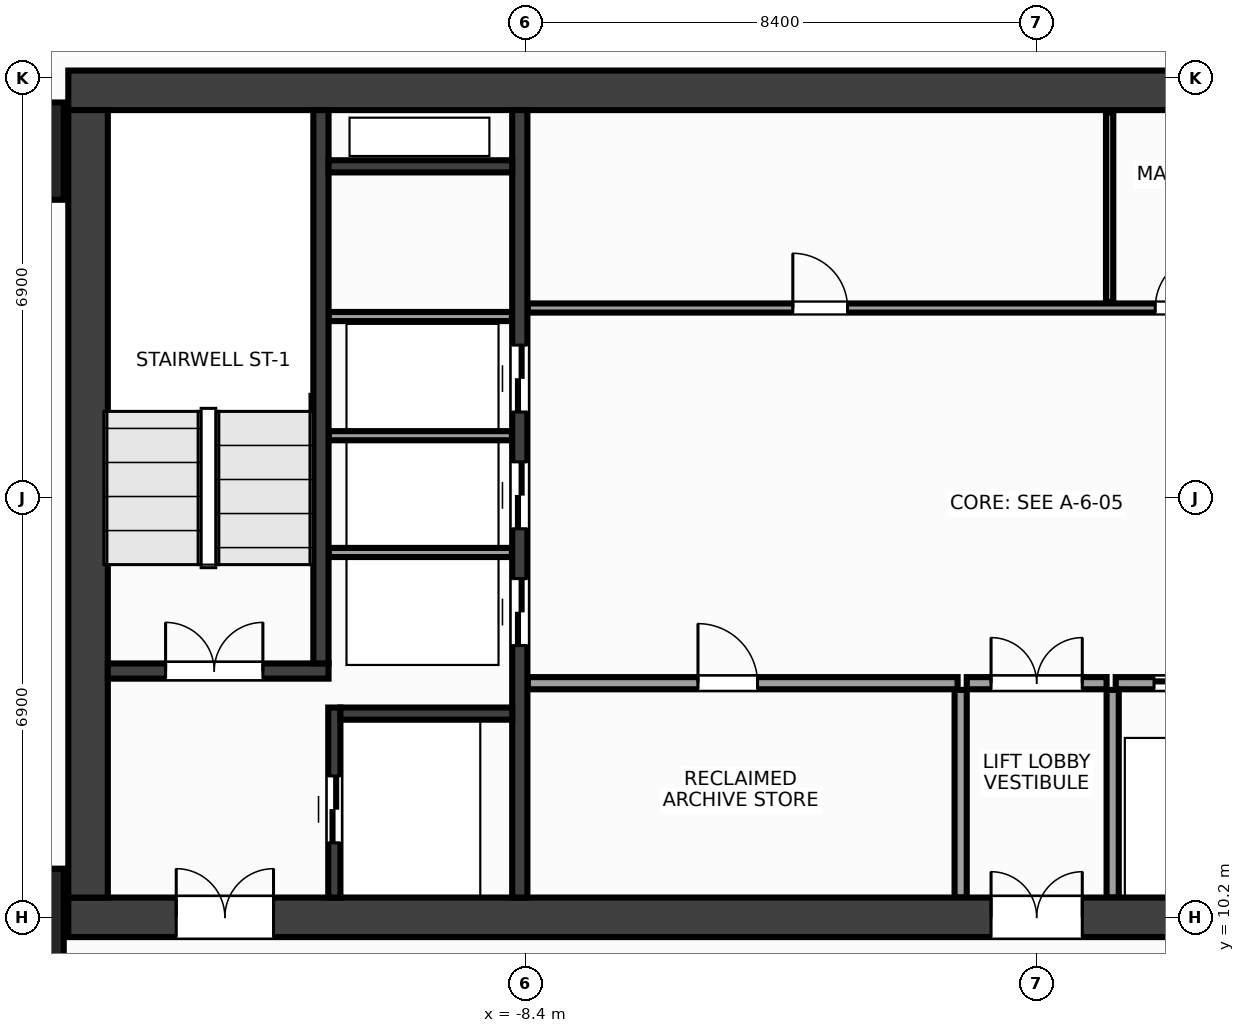
"""IFC4 building model, lengths in metres.
Left out: names, types, materials, properties, quantities, classifications, styles, units other than length and angle.
Written with IfcOpenShell. Run it as: python <this file> out.ifc"""

import sys

from ifc_helpers import new_model, si_unit, direction, frame, frame_2d, origin, origin_2d, place, context, subcontext, project, spatial, rectangle, extrude, source, transform, mapped, element, fill, save


model = new_model("IFC4")
c1 = context("Model", 3, precision=1e-05, world=origin(), true_north=direction((0.0, 1.0)))
c2 = subcontext(c1, "Body", "Model", "MODEL_VIEW")
j1 = project(units=[si_unit("LENGTHUNIT", "METRE"), si_unit("PLANEANGLEUNIT", "RADIAN")], contexts=[c1])
p1 = place(None, origin())
s1 = spatial("IfcSite", under=j1, at=p1, CompositionType="ELEMENT")
p2 = place(p1, origin())
s2 = spatial("IfcBuilding", under=s1, at=p2, CompositionType="ELEMENT")
p3 = place(p2, frame((0.0, 0.0, 174.8)))
s3 = spatial("IfcBuildingStorey", under=s2, at=p3, CompositionType="ELEMENT", Elevation=174.8)
m1 = source(origin(), c2, "Body", "SweptSolid", [
    extrude(rectangle(XDim=31.85, YDim=0.65, at=frame_2d((15.925, 0.0))), origin(), (0.0, 0.0, 1.0), 3.6),
])
p4 = place(p3, frame((-15.925, 23.8, 0.0), z_axis=(0.0, 0.0, 1.0), x_axis=(1.0, 0.0, 0.0)))
e1 = element("IfcWall", 1, at=p4, inside=s3, PredefinedType="SHEAR", context=c2, shape_type="MappedRepresentation", body=[
    mapped(m1, transform((0.0, 0.0, 0.0), x_axis=(1.0, 0.0, 0.0), y_axis=(0.0, 1.0, 0.0), z_axis=(0.0, 0.0, 1.0), scale=1.0)),
])
p5 = place(p3, frame((-15.925, 10.2, 0.0), z_axis=(0.0, 0.0, 1.0), x_axis=(1.0, 0.0, 0.0)))
e2 = element("IfcWall", 2, at=p5, inside=s3, PredefinedType="SHEAR", context=c2, shape_type="MappedRepresentation", body=[
    mapped(m1, transform((0.0, 0.0, 0.0), x_axis=(1.0, 0.0, 0.0), y_axis=(0.0, 1.0, 0.0), z_axis=(0.0, 0.0, 1.0), scale=1.0)),
])
p6 = place(p5, frame((1.775, 0.0, 0.0)))
e3 = element("IfcOpeningElement", 3, at=p6, cuts=e2, PredefinedType="OPENING", context=c2, shape_type="SweptSolid", body=[
    extrude(rectangle(XDim=1.6, YDim=2.15, at=frame_2d((0.8, 1.075))), frame((0.0, 0.337, 0.0), z_axis=(0.0, -1.0, 0.0), x_axis=(1.0, 0.0, 0.0)), (0.0, 0.0, 1.0), 0.674),
])
p7 = place(p5, frame((28.475, 0.0, 0.0)))
e4 = element("IfcOpeningElement", 4, at=p7, cuts=e2, PredefinedType="OPENING", context=c2, shape_type="SweptSolid", body=[
    extrude(rectangle(XDim=1.6, YDim=2.15, at=frame_2d((0.8, 1.075))), frame((0.0, 0.337, 0.0), z_axis=(0.0, -1.0, 0.0), x_axis=(1.0, 0.0, 0.0)), (0.0, 0.0, 1.0), 0.674),
])
p8 = place(p5, frame((15.175, 0.0, 0.0)))
e5 = element("IfcOpeningElement", 5, at=p8, cuts=e2, PredefinedType="OPENING", context=c2, shape_type="SweptSolid", body=[
    extrude(rectangle(XDim=1.5, YDim=2.2, at=frame_2d((0.75, 1.1))), frame((0.0, 0.337, 0.0), z_axis=(0.0, -1.0, 0.0), x_axis=(1.0, 0.0, 0.0)), (0.0, 0.0, 1.0), 0.674),
])
m2 = source(origin(), c2, "Body", "SweptSolid", [
    extrude(rectangle(XDim=12.95, YDim=0.65, at=frame_2d((6.475, 0.0))), origin(), (0.0, 0.0, 1.0), 3.6),
])
p9 = place(p3, frame((-15.6, 10.525, 0.0), z_axis=(0.0, 0.0, 1.0), x_axis=(0.0, 1.0, 0.0)))
e6 = element("IfcWall", 6, at=p9, inside=s3, PredefinedType="SHEAR", context=c2, shape_type="MappedRepresentation", body=[
    mapped(m2, transform((0.0, 0.0, 0.0), x_axis=(1.0, 0.0, 0.0), y_axis=(0.0, 1.0, 0.0), z_axis=(0.0, 0.0, 1.0), scale=1.0)),
])
m3 = source(origin(), c2, "Body", "SweptSolid", [
    extrude(rectangle(XDim=12.95, YDim=0.25, at=frame_2d((6.475, 0.0))), origin(), (0.0, 0.0, 1.0), 3.6),
])
p10 = place(p3, frame((-8.5, 10.525, 0.0), z_axis=(0.0, 0.0, 1.0), x_axis=(0.0, 1.0, 0.0)))
e7 = element("IfcWall", 7, at=p10, inside=s3, PredefinedType="SHEAR", context=c2, shape_type="MappedRepresentation", body=[
    mapped(m3, transform((0.0, 0.0, 0.0), x_axis=(1.0, 0.0, 0.0), y_axis=(0.0, 1.0, 0.0), z_axis=(0.0, 0.0, 1.0), scale=1.0)),
])
p11 = place(p10, frame((4.145, 0.0, 0.0)))
e8 = element("IfcOpeningElement", 8, at=p11, cuts=e7, PredefinedType="OPENING", context=c2, shape_type="SweptSolid", body=[
    extrude(rectangle(XDim=1.1, YDim=2.15, at=frame_2d((0.55, 1.075))), frame((0.0, 0.137, 0.0), z_axis=(0.0, -1.0, 0.0), x_axis=(1.0, 0.0, 0.0)), (0.0, 0.0, 1.0), 0.274),
])
p12 = place(p10, frame((6.065, 0.0, 0.0)))
e9 = element("IfcOpeningElement", 9, at=p12, cuts=e7, PredefinedType="OPENING", context=c2, shape_type="SweptSolid", body=[
    extrude(rectangle(XDim=1.1, YDim=2.15, at=frame_2d((0.55, 1.075))), frame((0.0, 0.137, 0.0), z_axis=(0.0, -1.0, 0.0), x_axis=(1.0, 0.0, 0.0)), (0.0, 0.0, 1.0), 0.274),
])
p13 = place(p10, frame((7.985, 0.0, 0.0)))
e10 = element("IfcOpeningElement", 10, at=p13, cuts=e7, PredefinedType="OPENING", context=c2, shape_type="SweptSolid", body=[
    extrude(rectangle(XDim=1.1, YDim=2.15, at=frame_2d((0.55, 1.075))), frame((0.0, 0.137, 0.0), z_axis=(0.0, -1.0, 0.0), x_axis=(1.0, 0.0, 0.0)), (0.0, 0.0, 1.0), 0.274),
])
m4 = source(origin(), c2, "Body", "SweptSolid", [
    extrude(rectangle(XDim=3.63, YDim=0.25, at=frame_2d((1.815, 0.0))), origin(), (0.0, 0.0, 1.0), 3.6),
])
p14 = place(p3, frame((-15.275, 14.25, 0.0), z_axis=(0.0, 0.0, 1.0), x_axis=(1.0, 0.0, 0.0)))
e11 = element("IfcWall", 11, at=p14, inside=s3, PredefinedType="SHEAR", context=c2, shape_type="MappedRepresentation", body=[
    mapped(m4, transform((0.0, 0.0, 0.0), x_axis=(1.0, 0.0, 0.0), y_axis=(0.0, 1.0, 0.0), z_axis=(0.0, 0.0, 1.0), scale=1.0)),
])
p15 = place(p14, frame((0.95, 0.0, 0.0)))
e12 = element("IfcOpeningElement", 12, at=p15, cuts=e11, PredefinedType="OPENING", context=c2, shape_type="SweptSolid", body=[
    extrude(rectangle(XDim=1.6, YDim=2.15, at=frame_2d((0.8, 1.075))), frame((0.0, 0.137, 0.0), z_axis=(0.0, -1.0, 0.0), x_axis=(1.0, 0.0, 0.0)), (0.0, 0.0, 1.0), 0.274),
])
m5 = source(origin(), c2, "Body", "SweptSolid", [
    extrude(rectangle(XDim=9.1, YDim=0.25, at=frame_2d((4.55, 0.0))), origin(), (0.0, 0.0, 1.0), 3.6),
])
p16 = place(p3, frame((-11.77, 14.375, 0.0), z_axis=(0.0, 0.0, 1.0), x_axis=(0.0, 1.0, 0.0)))
e13 = element("IfcWall", 13, at=p16, inside=s3, PredefinedType="SHEAR", context=c2, shape_type="MappedRepresentation", body=[
    mapped(m5, transform((0.0, 0.0, 0.0), x_axis=(1.0, 0.0, 0.0), y_axis=(0.0, 1.0, 0.0), z_axis=(0.0, 0.0, 1.0), scale=1.0)),
])
m6 = source(origin(), c2, "Body", "SweptSolid", [
    extrude(rectangle(XDim=3.125, YDim=0.2, at=frame_2d((1.562, 0.0))), origin(), (0.0, 0.0, 1.0), 3.6),
])
p17 = place(p3, frame((-11.55, 10.525, 0.0), z_axis=(0.0, 0.0, 1.0), x_axis=(0.0, 1.0, 0.0)))
e14 = element("IfcWall", 14, at=p17, inside=s3, PredefinedType="SHEAR", context=c2, shape_type="MappedRepresentation", body=[
    mapped(m6, transform((0.0, 0.0, 0.0), x_axis=(1.0, 0.0, 0.0), y_axis=(0.0, 1.0, 0.0), z_axis=(0.0, 0.0, 1.0), scale=1.0)),
])
p18 = place(p17, frame((0.9, 0.0, 0.0)))
e15 = element("IfcOpeningElement", 15, at=p18, cuts=e14, PredefinedType="OPENING", context=c2, shape_type="SweptSolid", body=[
    extrude(rectangle(XDim=1.1, YDim=2.15, at=frame_2d((0.55, 1.075))), frame((0.0, 0.112, 0.0), z_axis=(0.0, -1.0, 0.0), x_axis=(1.0, 0.0, 0.0)), (0.0, 0.0, 1.0), 0.224),
])
m7 = source(origin(), c2, "Body", "SweptSolid", [
    extrude(rectangle(XDim=2.825, YDim=0.2, at=frame_2d((1.413, 0.0))), origin(), (0.0, 0.0, 1.0), 3.6),
])
p19 = place(p3, frame((-11.45, 13.55, 0.0), z_axis=(0.0, 0.0, 1.0), x_axis=(1.0, 0.0, 0.0)))
e16 = element("IfcWall", 16, at=p19, inside=s3, PredefinedType="SHEAR", context=c2, shape_type="MappedRepresentation", body=[
    mapped(m7, transform((0.0, 0.0, 0.0), x_axis=(1.0, 0.0, 0.0), y_axis=(0.0, 1.0, 0.0), z_axis=(0.0, 0.0, 1.0), scale=1.0)),
])
m8 = source(origin(), c2, "Body", "SweptSolid", [
    extrude(rectangle(XDim=3.02, YDim=0.2, at=frame_2d((1.51, 0.0))), origin(), (0.0, 0.0, 1.0), 3.6),
])
p20 = place(p3, frame((-11.645, 22.55, 0.0), z_axis=(0.0, 0.0, 1.0), x_axis=(1.0, 0.0, 0.0)))
e17 = element("IfcWall", 17, at=p20, inside=s3, PredefinedType="SHEAR", context=c2, shape_type="MappedRepresentation", body=[
    mapped(m8, transform((0.0, 0.0, 0.0), x_axis=(1.0, 0.0, 0.0), y_axis=(0.0, 1.0, 0.0), z_axis=(0.0, 0.0, 1.0), scale=1.0)),
])
m9 = source(origin(), c2, "Body", "SweptSolid", [
    extrude(rectangle(XDim=1.6, YDim=1.6, at=origin_2d()), origin(), (0.0, 0.0, 1.0), 3.6),
])
for number, where, z_axis, x_axis in (
    (18, (-16.8, 10.2, 0.0), (0.0, 0.0, 1.0), (1.0, 0.0, 0.0)),
    (19, (-16.8, 22.8, 0.0), (0.0, 0.0, 1.0), (1.0, 0.0, 0.0)),
):
    element("IfcColumn", number, at=place(p3, frame(where, z_axis=z_axis, x_axis=x_axis)), inside=s3, PredefinedType="COLUMN", context=c2, shape_type="MappedRepresentation", body=[
        mapped(m9, transform((0.0, 0.0, 0.0), x_axis=(1.0, 0.0, 0.0), y_axis=(0.0, 1.0, 0.0), z_axis=(0.0, 0.0, 1.0), scale=1.0)),
    ])
m10 = source(origin(), c2, "Body", "SweptSolid", [
    extrude(rectangle(XDim=3.01, YDim=0.15, at=frame_2d((1.505, 0.0))), origin(), (0.0, 0.0, 1.0), 3.38),
])
for number, where, z_axis, x_axis in (
    (20, (-11.64, 16.2, 0.0), (0.0, 0.0, 1.0), (1.0, 0.0, 0.0)),
    (21, (-11.64, 18.12, 0.0), (0.0, 0.0, 1.0), (1.0, 0.0, 0.0)),
    (22, (-11.64, 20.08, 0.0), (0.0, 0.0, 1.0), (1.0, 0.0, 0.0)),
):
    element("IfcWall", number, at=place(p3, frame(where, z_axis=z_axis, x_axis=x_axis)), inside=s3, PredefinedType="PARTITIONING", context=c2, shape_type="MappedRepresentation", body=[
        mapped(m10, transform((0.0, 0.0, 0.0), x_axis=(1.0, 0.0, 0.0), y_axis=(0.0, 1.0, 0.0), z_axis=(0.0, 0.0, 1.0), scale=1.0)),
    ])
m11 = source(origin(), c2, "Body", "SweptSolid", [
    extrude(rectangle(XDim=7.07, YDim=0.2, at=frame_2d((3.535, 0.0))), origin(), (0.0, 0.0, 1.0), 3.38),
])
p21 = place(p3, frame((-8.37, 14.05, 0.0), z_axis=(0.0, 0.0, 1.0), x_axis=(1.0, 0.0, 0.0)))
e23 = element("IfcWall", 23, at=p21, inside=s3, PredefinedType="PARTITIONING", context=c2, shape_type="MappedRepresentation", body=[
    mapped(m11, transform((0.0, 0.0, 0.0), x_axis=(1.0, 0.0, 0.0), y_axis=(0.0, 1.0, 0.0), z_axis=(0.0, 0.0, 1.0), scale=1.0)),
])
p22 = place(p21, frame((2.8, 0.0, 0.0)))
e24 = element("IfcOpeningElement", 24, at=p22, cuts=e23, PredefinedType="OPENING", context=c2, shape_type="SweptSolid", body=[
    extrude(rectangle(XDim=0.98, YDim=2.15, at=frame_2d((0.49, 1.075))), frame((0.0, 0.112, 0.0), z_axis=(0.0, -1.0, 0.0), x_axis=(1.0, 0.0, 0.0)), (0.0, 0.0, 1.0), 0.224),
])
p23 = place(p3, frame((1.3, 14.05, 0.0), z_axis=(0.0, 0.0, 1.0), x_axis=(1.0, 0.0, 0.0)))
e25 = element("IfcWall", 25, at=p23, inside=s3, PredefinedType="PARTITIONING", context=c2, shape_type="MappedRepresentation", body=[
    mapped(m11, transform((0.0, 0.0, 0.0), x_axis=(1.0, 0.0, 0.0), y_axis=(0.0, 1.0, 0.0), z_axis=(0.0, 0.0, 1.0), scale=1.0)),
])
p24 = place(p23, frame((0.63, 0.0, 0.0)))
e26 = element("IfcOpeningElement", 26, at=p24, cuts=e25, PredefinedType="OPENING", context=c2, shape_type="SweptSolid", body=[
    extrude(rectangle(XDim=1.1, YDim=2.15, at=frame_2d((0.55, 1.075))), frame((0.0, 0.112, 0.0), z_axis=(0.0, -1.0, 0.0), x_axis=(1.0, 0.0, 0.0)), (0.0, 0.0, 1.0), 0.224),
])
p25 = place(p23, frame((2.98, 0.0, 0.0)))
e27 = element("IfcOpeningElement", 27, at=p25, cuts=e25, PredefinedType="OPENING", context=c2, shape_type="SweptSolid", body=[
    extrude(rectangle(XDim=1.1, YDim=2.15, at=frame_2d((0.55, 1.075))), frame((0.0, 0.112, 0.0), z_axis=(0.0, -1.0, 0.0), x_axis=(1.0, 0.0, 0.0)), (0.0, 0.0, 1.0), 0.224),
])
p26 = place(p23, frame((5.33, 0.0, 0.0)))
e28 = element("IfcOpeningElement", 28, at=p26, cuts=e25, PredefinedType="OPENING", context=c2, shape_type="SweptSolid", body=[
    extrude(rectangle(XDim=1.1, YDim=2.15, at=frame_2d((0.55, 1.075))), frame((0.0, 0.112, 0.0), z_axis=(0.0, -1.0, 0.0), x_axis=(1.0, 0.0, 0.0)), (0.0, 0.0, 1.0), 0.224),
])
m12 = source(origin(), c2, "Body", "SweptSolid", [
    extrude(rectangle(XDim=3.415, YDim=0.2, at=frame_2d((1.708, 0.0))), origin(), (0.0, 0.0, 1.0), 3.38),
])
for number, where, z_axis, x_axis in (
    (29, (-1.25, 10.525, 0.0), (0.0, 0.0, 1.0), (0.0, 1.0, 0.0)),
    (30, (1.25, 10.525, 0.0), (0.0, 0.0, 1.0), (0.0, 1.0, 0.0)),
):
    element("IfcWall", number, at=place(p3, frame(where, z_axis=z_axis, x_axis=x_axis)), inside=s3, PredefinedType="PARTITIONING", context=c2, shape_type="MappedRepresentation", body=[
        mapped(m12, transform((0.0, 0.0, 0.0), x_axis=(1.0, 0.0, 0.0), y_axis=(0.0, 1.0, 0.0), z_axis=(0.0, 0.0, 1.0), scale=1.0)),
    ])
m13 = source(origin(), c2, "Body", "SweptSolid", [
    extrude(rectangle(XDim=2.3, YDim=0.2, at=frame_2d((1.15, 0.0))), origin(), (0.0, 0.0, 1.0), 3.38),
])
p27 = place(p3, frame((-1.15, 14.05, 0.0), z_axis=(0.0, 0.0, 1.0), x_axis=(1.0, 0.0, 0.0)))
e31 = element("IfcWall", 31, at=p27, inside=s3, PredefinedType="PARTITIONING", context=c2, shape_type="MappedRepresentation", body=[
    mapped(m13, transform((0.0, 0.0, 0.0), x_axis=(1.0, 0.0, 0.0), y_axis=(0.0, 1.0, 0.0), z_axis=(0.0, 0.0, 1.0), scale=1.0)),
])
p28 = place(p27, frame((0.4, 0.0, 0.0)))
e32 = element("IfcOpeningElement", 32, at=p28, cuts=e31, PredefinedType="OPENING", context=c2, shape_type="SweptSolid", body=[
    extrude(rectangle(XDim=1.5, YDim=2.2, at=frame_2d((0.75, 1.1))), frame((0.0, 0.112, 0.0), z_axis=(0.0, -1.0, 0.0), x_axis=(1.0, 0.0, 0.0)), (0.0, 0.0, 1.0), 0.224),
])
m14 = source(origin(), c2, "Body", "SweptSolid", [
    extrude(rectangle(XDim=14.59, YDim=0.15, at=frame_2d((7.295, 0.0))), origin(), (0.0, 0.0, 1.0), 3.38),
])
p29 = place(p3, frame((-8.37, 20.22, 0.0), z_axis=(0.0, 0.0, 1.0), x_axis=(1.0, 0.0, 0.0)))
e33 = element("IfcWall", 33, at=p29, inside=s3, PredefinedType="PARTITIONING", context=c2, shape_type="MappedRepresentation", body=[
    mapped(m14, transform((0.0, 0.0, 0.0), x_axis=(1.0, 0.0, 0.0), y_axis=(0.0, 1.0, 0.0), z_axis=(0.0, 0.0, 1.0), scale=1.0)),
])
p30 = place(p29, frame((4.36, 0.0, 0.0)))
e34 = element("IfcOpeningElement", 34, at=p30, cuts=e33, PredefinedType="OPENING", context=c2, shape_type="SweptSolid", body=[
    extrude(rectangle(XDim=0.9, YDim=2.15, at=frame_2d((0.45, 1.075))), frame((0.0, 0.087, 0.0), z_axis=(0.0, -1.0, 0.0), x_axis=(1.0, 0.0, 0.0)), (0.0, 0.0, 1.0), 0.174),
])
p31 = place(p29, frame((10.32, 0.0, 0.0)))
e35 = element("IfcOpeningElement", 35, at=p31, cuts=e33, PredefinedType="OPENING", context=c2, shape_type="SweptSolid", body=[
    extrude(rectangle(XDim=0.9, YDim=2.15, at=frame_2d((0.45, 1.075))), frame((0.0, 0.087, 0.0), z_axis=(0.0, -1.0, 0.0), x_axis=(1.0, 0.0, 0.0)), (0.0, 0.0, 1.0), 0.174),
])
p32 = place(p29, frame((12.77, 0.0, 0.0)))
e36 = element("IfcOpeningElement", 36, at=p32, cuts=e33, PredefinedType="OPENING", context=c2, shape_type="SweptSolid", body=[
    extrude(rectangle(XDim=0.9, YDim=2.15, at=frame_2d((0.45, 1.075))), frame((0.0, 0.087, 0.0), z_axis=(0.0, -1.0, 0.0), x_axis=(1.0, 0.0, 0.0)), (0.0, 0.0, 1.0), 0.174),
])
m15 = source(origin(), c2, "Body", "SweptSolid", [
    extrude(rectangle(XDim=3.115, YDim=0.12, at=frame_2d((1.558, 0.0))), origin(), (0.0, 0.0, 1.0), 3.38),
])
p33 = place(p3, frame((1.2, 20.32, 0.0), z_axis=(0.0, 0.0, 1.0), x_axis=(0.0, 1.0, 0.0)))
e37 = element("IfcWall", 37, at=p33, inside=s3, PredefinedType="PARTITIONING", context=c2, shape_type="MappedRepresentation", body=[
    mapped(m15, transform((0.0, 0.0, 0.0), x_axis=(1.0, 0.0, 0.0), y_axis=(0.0, 1.0, 0.0), z_axis=(0.0, 0.0, 1.0), scale=1.0)),
])
m16 = source(origin(), c2, "Body", "SweptSolid", [
    extrude(rectangle(XDim=1.6, YDim=2.15, at=frame_2d((0.8, 1.075))), frame((0.0, 0.025, 0.0), z_axis=(0.0, -1.0, 0.0), x_axis=(1.0, 0.0, 0.0)), (0.0, 0.0, 1.0), 0.05),
])
p34 = place(p15, origin())
e38 = element("IfcDoor", 38, at=p34, inside=s3, OperationType="DOUBLE_DOOR_SINGLE_SWING", PredefinedType="DOOR", context=c2, shape_type="MappedRepresentation", body=[
    mapped(m16, transform((0.0, 0.0, 0.0), x_axis=(1.0, 0.0, 0.0), y_axis=(0.0, 1.0, 0.0), z_axis=(0.0, 0.0, 1.0), scale=1.0)),
])
fill(e12, e38)
p35 = place(p6, origin())
e39 = element("IfcDoor", 39, at=p35, inside=s3, OperationType="DOUBLE_DOOR_SINGLE_SWING", PredefinedType="DOOR", context=c2, shape_type="MappedRepresentation", body=[
    mapped(m16, transform((0.0, 0.0, 0.0), x_axis=(1.0, 0.0, 0.0), y_axis=(0.0, 1.0, 0.0), z_axis=(0.0, 0.0, 1.0), scale=1.0)),
])
fill(e3, e39)
m17 = source(origin(), c2, "Body", "SweptSolid", [
    extrude(rectangle(XDim=1.1, YDim=2.15, at=frame_2d((0.55, 1.075))), frame((0.0, 0.025, 0.0), z_axis=(0.0, -1.0, 0.0), x_axis=(1.0, 0.0, 0.0)), (0.0, 0.0, 1.0), 0.05),
])
p36 = place(p18, origin())
e40 = element("IfcDoor", 40, at=p36, inside=s3, OperationType="DOUBLE_DOOR_SLIDING", PredefinedType="DOOR", context=c2, shape_type="MappedRepresentation", body=[
    mapped(m17, transform((0.0, 0.0, 0.0), x_axis=(1.0, 0.0, 0.0), y_axis=(0.0, 1.0, 0.0), z_axis=(0.0, 0.0, 1.0), scale=1.0)),
])
fill(e15, e40)
p37 = place(p11, origin())
e41 = element("IfcDoor", 41, at=p37, inside=s3, OperationType="DOUBLE_DOOR_SLIDING", PredefinedType="DOOR", context=c2, shape_type="MappedRepresentation", body=[
    mapped(m17, transform((0.0, 0.0, 0.0), x_axis=(1.0, 0.0, 0.0), y_axis=(0.0, 1.0, 0.0), z_axis=(0.0, 0.0, 1.0), scale=1.0)),
])
fill(e8, e41)
p38 = place(p12, origin())
e42 = element("IfcDoor", 42, at=p38, inside=s3, OperationType="DOUBLE_DOOR_SLIDING", PredefinedType="DOOR", context=c2, shape_type="MappedRepresentation", body=[
    mapped(m17, transform((0.0, 0.0, 0.0), x_axis=(1.0, 0.0, 0.0), y_axis=(0.0, 1.0, 0.0), z_axis=(0.0, 0.0, 1.0), scale=1.0)),
])
fill(e9, e42)
p39 = place(p13, origin())
e43 = element("IfcDoor", 43, at=p39, inside=s3, OperationType="DOUBLE_DOOR_SLIDING", PredefinedType="DOOR", context=c2, shape_type="MappedRepresentation", body=[
    mapped(m17, transform((0.0, 0.0, 0.0), x_axis=(1.0, 0.0, 0.0), y_axis=(0.0, 1.0, 0.0), z_axis=(0.0, 0.0, 1.0), scale=1.0)),
])
fill(e10, e43)
m18 = source(origin(), c2, "Body", "SweptSolid", [
    extrude(rectangle(XDim=0.98, YDim=2.15, at=frame_2d((0.49, 1.075))), frame((0.0, 0.025, 0.0), z_axis=(0.0, -1.0, 0.0), x_axis=(1.0, 0.0, 0.0)), (0.0, 0.0, 1.0), 0.05),
])
p40 = place(p22, origin())
e44 = element("IfcDoor", 44, at=p40, inside=s3, OperationType="SINGLE_SWING_LEFT", PredefinedType="DOOR", context=c2, shape_type="MappedRepresentation", body=[
    mapped(m18, transform((0.0, 0.0, 0.0), x_axis=(1.0, 0.0, 0.0), y_axis=(0.0, 1.0, 0.0), z_axis=(0.0, 0.0, 1.0), scale=1.0)),
])
fill(e24, e44)
p41 = place(p24, origin())
e45 = element("IfcDoor", 45, at=p41, inside=s3, OperationType="DOUBLE_DOOR_SLIDING", PredefinedType="DOOR", context=c2, shape_type="MappedRepresentation", body=[
    mapped(m17, transform((0.0, 0.0, 0.0), x_axis=(1.0, 0.0, 0.0), y_axis=(0.0, 1.0, 0.0), z_axis=(0.0, 0.0, 1.0), scale=1.0)),
])
fill(e26, e45)
m19 = source(origin(), c2, "Body", "SweptSolid", [
    extrude(rectangle(XDim=1.5, YDim=2.2, at=frame_2d((0.75, 1.1))), frame((0.0, 0.025, 0.0), z_axis=(0.0, -1.0, 0.0), x_axis=(1.0, 0.0, 0.0)), (0.0, 0.0, 1.0), 0.05),
])
p42 = place(p28, origin())
e46 = element("IfcDoor", 46, at=p42, inside=s3, OperationType="DOUBLE_DOOR_SINGLE_SWING", PredefinedType="DOOR", context=c2, shape_type="MappedRepresentation", body=[
    mapped(m19, transform((0.0, 0.0, 0.0), x_axis=(1.0, 0.0, 0.0), y_axis=(0.0, 1.0, 0.0), z_axis=(0.0, 0.0, 1.0), scale=1.0)),
])
fill(e32, e46)
p43 = place(p8, origin())
e47 = element("IfcDoor", 47, at=p43, inside=s3, OperationType="DOUBLE_DOOR_SINGLE_SWING", PredefinedType="DOOR", context=c2, shape_type="MappedRepresentation", body=[
    mapped(m19, transform((0.0, 0.0, 0.0), x_axis=(1.0, 0.0, 0.0), y_axis=(0.0, 1.0, 0.0), z_axis=(0.0, 0.0, 1.0), scale=1.0)),
])
fill(e5, e47)
m20 = source(origin(), c2, "Body", "SweptSolid", [
    extrude(rectangle(XDim=0.9, YDim=2.15, at=frame_2d((0.45, 1.075))), frame((0.0, 0.025, 0.0), z_axis=(0.0, -1.0, 0.0), x_axis=(1.0, 0.0, 0.0)), (0.0, 0.0, 1.0), 0.05),
])
p44 = place(p30, origin())
e48 = element("IfcDoor", 48, at=p44, inside=s3, OperationType="SINGLE_SWING_LEFT", PredefinedType="DOOR", context=c2, shape_type="MappedRepresentation", body=[
    mapped(m20, transform((0.0, 0.0, 0.0), x_axis=(1.0, 0.0, 0.0), y_axis=(0.0, 1.0, 0.0), z_axis=(0.0, 0.0, 1.0), scale=1.0)),
])
fill(e34, e48)
p45 = place(p31, origin())
e49 = element("IfcDoor", 49, at=p45, inside=s3, OperationType="SINGLE_SWING_RIGHT", PredefinedType="DOOR", context=c2, shape_type="MappedRepresentation", body=[
    mapped(m20, transform((0.0, 0.0, 0.0), x_axis=(1.0, 0.0, 0.0), y_axis=(0.0, 1.0, 0.0), z_axis=(0.0, 0.0, 1.0), scale=1.0)),
])
fill(e35, e49)
save(model, sys.argv[1])
